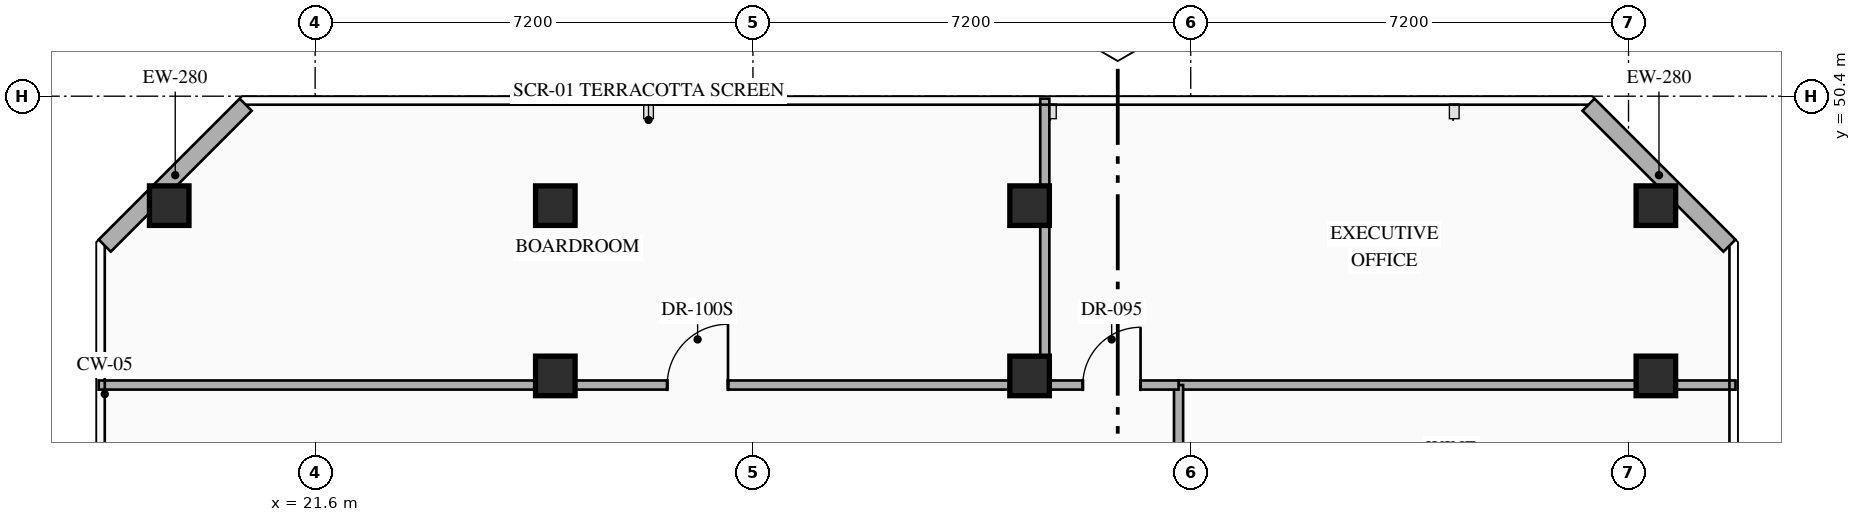
"""IFC4 building model, lengths in metres.
Left out: names, types, materials, properties, quantities, classifications, styles, units other than length and angle.
Written with IfcOpenShell. Run it as: python <this file> out.ifc"""

import sys

from ifc_helpers import new_model, si_unit, direction, frame, frame_2d, origin, origin_2d, place, context, subcontext, project, spatial, rectangle, hollow_rectangle, extrude, element, fill, save


model = new_model("IFC4")
c1 = context("Model", 3, precision=1e-05, world=origin(), true_north=direction((0.0, 1.0)))
c2 = subcontext(c1, "Body", "Model", "MODEL_VIEW")
j1 = project(units=[si_unit("LENGTHUNIT", "METRE"), si_unit("PLANEANGLEUNIT", "RADIAN")], contexts=[c1])
p1 = place(None, origin())
s1 = spatial("IfcSite", under=j1, at=p1, CompositionType="ELEMENT")
p2 = place(p1, origin())
s2 = spatial("IfcBuilding", under=s1, at=p2, CompositionType="ELEMENT")
p3 = place(p2, frame((0.0, 0.0, 261.75)))
s3 = spatial("IfcBuildingStorey", under=s2, at=p3, CompositionType="ELEMENT", Elevation=261.75)
for number, where, z_axis, x_axis in (
    (1, (25.55, 45.8, 0.0), (0.0, 0.0, 1.0), (1.0, 0.0, 0.0)),
    (2, (33.35, 45.8, 0.0), (0.0, 0.0, 1.0), (1.0, 0.0, 0.0)),
    (3, (43.65, 45.8, 0.0), (0.0, 0.0, 1.0), (1.0, 0.0, 0.0)),
):
    element("IfcColumn", number, at=place(p3, frame(where, z_axis=z_axis, x_axis=x_axis)), inside=s3, PredefinedType="COLUMN", context=c2, shape_type="SweptSolid", body=[
        extrude(hollow_rectangle(XDim=0.65, YDim=0.65, WallThickness=0.025, at=origin_2d()), origin(), (0.0, 0.0, 1.0), 4.2),
    ])
for number, where, z_axis, x_axis in (
    (4, (19.2, 48.6, 0.0), (0.0, 0.0, 1.0), (1.0, 0.0, 0.0)),
    (5, (25.55, 48.6, 0.0), (0.0, 0.0, 1.0), (1.0, 0.0, 0.0)),
    (6, (33.35, 48.6, 0.0), (0.0, 0.0, 1.0), (1.0, 0.0, 0.0)),
    (7, (43.65, 48.6, 0.0), (0.0, 0.0, 1.0), (1.0, 0.0, 0.0)),
):
    element("IfcColumn", number, at=place(p3, frame(where, z_axis=z_axis, x_axis=x_axis)), inside=s3, PredefinedType="COLUMN", context=c2, shape_type="SweptSolid", body=[
        extrude(hollow_rectangle(XDim=0.65, YDim=0.65, WallThickness=0.025, at=origin_2d()), origin(), (0.0, 0.0, 1.0), 3.918),
    ])
for number, where, z_axis, x_axis in (
    (8, (18.14, 47.942, 0.0), (0.0, 0.0, 1.0), (0.707, 0.707, 0.0)),
    (9, (42.542, 50.26, 0.0), (0.0, 0.0, 1.0), (0.707, -0.707, 0.0)),
):
    element("IfcWall", number, at=place(p3, frame(where, z_axis=z_axis, x_axis=x_axis)), inside=s3, PredefinedType="STANDARD", context=c2, shape_type="SweptSolid", body=[
        extrude(rectangle(XDim=3.278, YDim=0.28, at=frame_2d((1.639, 0.0))), origin(), (0.0, 0.0, 1.0), 3.94),
    ])
p4 = place(p3, frame((35.8, 45.65, 0.0), z_axis=(0.0, 0.0, 1.0), x_axis=(1.0, 0.0, 0.0)))
e10 = element("IfcWall", 10, at=p4, inside=s3, PredefinedType="PARTITIONING", context=c2, shape_type="SweptSolid", body=[
    extrude(rectangle(XDim=9.16, YDim=0.15, at=frame_2d((4.58, 0.0))), origin(), (0.0, 0.0, 1.0), 3.357),
])
p5 = place(p3, frame((35.8, 42.65, 0.0), z_axis=(0.0, 0.0, 1.0), x_axis=(0.0, 1.0, 0.0)))
e11 = element("IfcWall", 11, at=p5, inside=s3, PredefinedType="PARTITIONING", context=c2, shape_type="SweptSolid", body=[
    extrude(rectangle(XDim=3.0, YDim=0.15, at=frame_2d((1.5, 0.0))), origin(), (0.0, 0.0, 1.0), 3.94),
])
p6 = place(p5, frame((1.025, 0.0, 0.0)))
e12 = element("IfcOpeningElement", 12, at=p6, cuts=e11, PredefinedType="OPENING", context=c2, shape_type="SweptSolid", body=[
    extrude(rectangle(XDim=0.95, YDim=2.15, at=frame_2d((0.475, 1.075))), frame((0.0, 0.085, 0.0), z_axis=(0.0, -1.0, 0.0), x_axis=(1.0, 0.0, 0.0)), (0.0, 0.0, 1.0), 0.17),
])
p7 = place(p3, frame((18.04, 45.65, 0.0), z_axis=(0.0, 0.0, 1.0), x_axis=(1.0, 0.0, 0.0)))
e13 = element("IfcWall", 13, at=p7, inside=s3, PredefinedType="PARTITIONING", context=c2, shape_type="SweptSolid", body=[
    extrude(rectangle(XDim=15.56, YDim=0.15, at=frame_2d((7.78, 0.0))), origin(), (0.0, 0.0, 1.0), 3.357),
])
p8 = place(p7, frame((9.35, 0.0, 0.0)))
e14 = element("IfcOpeningElement", 14, at=p8, cuts=e13, PredefinedType="OPENING", context=c2, shape_type="SweptSolid", body=[
    extrude(rectangle(XDim=1.0, YDim=2.15, at=frame_2d((0.5, 1.075))), frame((0.0, 0.085, 0.0), z_axis=(0.0, -1.0, 0.0), x_axis=(1.0, 0.0, 0.0)), (0.0, 0.0, 1.0), 0.17),
])
p9 = place(p3, frame((33.6, 45.65, 0.0), z_axis=(0.0, 0.0, 1.0), x_axis=(0.0, 1.0, 0.0)))
e15 = element("IfcWall", 15, at=p9, inside=s3, PredefinedType="PARTITIONING", context=c2, shape_type="SweptSolid", body=[
    extrude(rectangle(XDim=4.71, YDim=0.15, at=frame_2d((2.355, 0.0))), origin(), (0.0, 0.0, 1.0), 3.94),
])
p10 = place(p3, frame((33.6, 45.65, 0.0), z_axis=(0.0, 0.0, 1.0), x_axis=(1.0, 0.0, 0.0)))
e16 = element("IfcWall", 16, at=p10, inside=s3, PredefinedType="PARTITIONING", context=c2, shape_type="SweptSolid", body=[
    extrude(rectangle(XDim=2.2, YDim=0.15, at=frame_2d((1.1, 0.0))), origin(), (0.0, 0.0, 1.0), 3.357),
])
p11 = place(p10, frame((0.625, 0.0, 0.0)))
e17 = element("IfcOpeningElement", 17, at=p11, cuts=e16, PredefinedType="OPENING", context=c2, shape_type="SweptSolid", body=[
    extrude(rectangle(XDim=0.95, YDim=2.15, at=frame_2d((0.475, 1.075))), frame((0.0, 0.085, 0.0), z_axis=(0.0, -1.0, 0.0), x_axis=(1.0, 0.0, 0.0)), (0.0, 0.0, 1.0), 0.17),
])
p12 = place(p8, origin())
e18 = element("IfcDoor", 18, at=p12, inside=s3, OperationType="SINGLE_SWING_RIGHT", PredefinedType="DOOR", context=c2, shape_type="SweptSolid", body=[
    extrude(rectangle(XDim=1.0, YDim=2.15, at=frame_2d((0.5, 1.075))), frame((0.0, 0.025, 0.0), z_axis=(0.0, -1.0, 0.0), x_axis=(1.0, 0.0, 0.0)), (0.0, 0.0, 1.0), 0.05),
])
fill(e14, e18)
p13 = place(p11, origin())
e19 = element("IfcDoor", 19, at=p13, inside=s3, OperationType="SINGLE_SWING_RIGHT", PredefinedType="DOOR", context=c2, shape_type="SweptSolid", body=[
    extrude(rectangle(XDim=0.95, YDim=2.15, at=frame_2d((0.475, 1.075))), frame((0.0, 0.025, 0.0), z_axis=(0.0, -1.0, 0.0), x_axis=(1.0, 0.0, 0.0)), (0.0, 0.0, 1.0), 0.05),
])
fill(e17, e19)
save(model, sys.argv[1])
